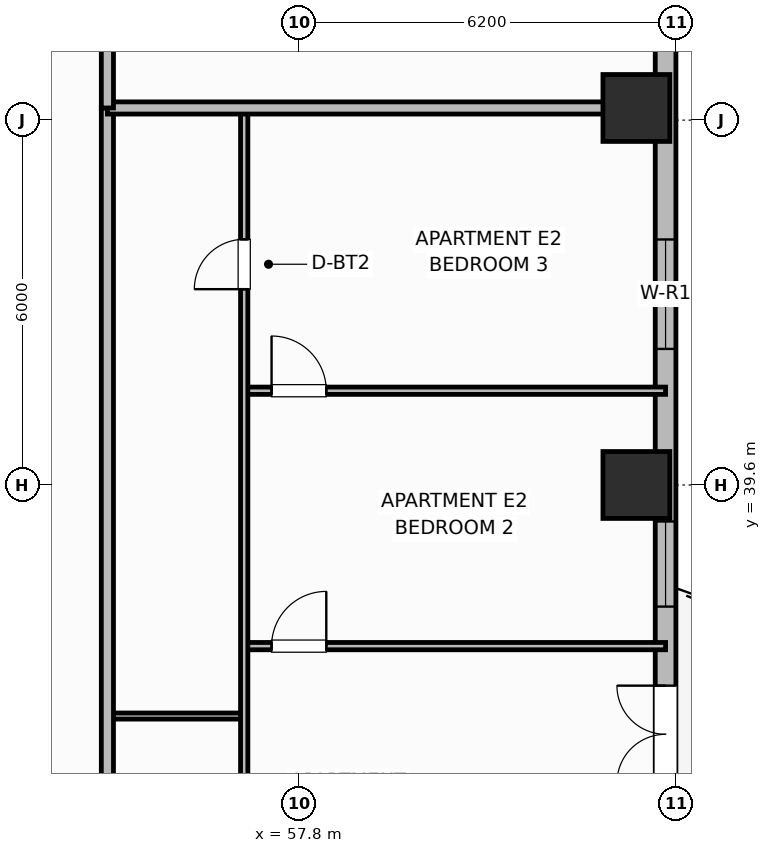
"""IFC4 building model, lengths in metres.
Left out: names, types, materials, properties, quantities, classifications, styles, units other than length and angle.
Written with IfcOpenShell. Run it as: python <this file> out.ifc"""

import sys

from ifc_helpers import new_model, si_unit, direction, frame, frame_2d, origin, origin_2d, place, context, subcontext, project, spatial, rectangle, extrude, element, fill, save


model = new_model("IFC4")
c1 = context("Model", 3, precision=1e-05, world=origin(), true_north=direction((0.0, 1.0)))
c2 = subcontext(c1, "Body", "Model", "MODEL_VIEW")
j1 = project(units=[si_unit("LENGTHUNIT", "METRE"), si_unit("PLANEANGLEUNIT", "RADIAN")], contexts=[c1])
p1 = place(None, origin())
s1 = spatial("IfcSite", under=j1, at=p1, CompositionType="ELEMENT")
p2 = place(p1, origin())
s2 = spatial("IfcBuilding", under=s1, at=p2, CompositionType="ELEMENT")
p3 = place(p2, frame((0.0, 0.0, 95.7)))
s3 = spatial("IfcBuildingStorey", under=s2, at=p3, CompositionType="ELEMENT", Elevation=95.7)
for number, where, z_axis, x_axis in (
    (1, (63.35, 39.6, 0.0), (0.0, 0.0, 1.0), (1.0, 0.0, 0.0)),
    (2, (63.35, 45.8, 0.0), (0.0, 0.0, 1.0), (1.0, 0.0, 0.0)),
):
    element("IfcColumn", number, at=place(p3, frame(where, z_axis=z_axis, x_axis=x_axis)), inside=s3, PredefinedType="COLUMN", context=c2, shape_type="SweptSolid", body=[
        extrude(rectangle(XDim=1.1, YDim=1.1, at=origin_2d()), origin(), (0.0, 0.0, 1.0), 3.7),
    ])
p4 = place(p3, frame((63.83, 32.6, 0.0), z_axis=(0.0, 0.0, 1.0), x_axis=(0.0, 1.0, 0.0)))
e3 = element("IfcWall", 3, at=p4, inside=s3, PredefinedType="SOLIDWALL", context=c2, shape_type="SweptSolid", body=[
    extrude(rectangle(XDim=14.8, YDim=0.34, at=frame_2d((7.4, 0.0))), origin(), (0.0, 0.0, 1.0), 2.7),
])
p5 = place(p4, frame((2.1, 0.0, 0.0)))
e4 = element("IfcOpeningElement", 4, at=p5, cuts=e3, PredefinedType="OPENING", context=c2, shape_type="SweptSolid", body=[
    extrude(rectangle(XDim=1.6, YDim=2.1, at=frame_2d((0.8, 1.05))), frame((0.0, 0.18, 0.0), z_axis=(0.0, -1.0, 0.0), x_axis=(1.0, 0.0, 0.0)), (0.0, 0.0, 1.0), 0.36),
])
p6 = place(p4, frame((5.0, 0.0, 0.69)))
e5 = element("IfcOpeningElement", 5, at=p6, cuts=e3, PredefinedType="OPENING", context=c2, shape_type="SweptSolid", body=[
    extrude(rectangle(XDim=1.4, YDim=1.85, at=frame_2d((0.7, 0.925))), frame((0.0, 0.18, 0.0), z_axis=(0.0, -1.0, 0.0), x_axis=(1.0, 0.0, 0.0)), (0.0, 0.0, 1.0), 0.36),
])
p7 = place(p4, frame((9.238, 0.0, 0.73)))
e6 = element("IfcOpeningElement", 6, at=p7, cuts=e3, PredefinedType="OPENING", context=c2, shape_type="SweptSolid", body=[
    extrude(rectangle(XDim=1.8, YDim=1.85, at=frame_2d((0.9, 0.925))), frame((0.0, 0.18, 0.0), z_axis=(0.0, -1.0, 0.0), x_axis=(1.0, 0.0, 0.0)), (0.0, 0.0, 1.0), 0.36),
])
p8 = place(p3, frame((54.65, 35.8, 0.0), z_axis=(0.0, 0.0, 1.0), x_axis=(1.0, 0.0, 0.0)))
e7 = element("IfcWall", 7, at=p8, inside=s3, PredefinedType="PARTITIONING", context=c2, shape_type="SweptSolid", body=[
    extrude(rectangle(XDim=2.25, YDim=0.1, at=frame_2d((1.125, 0.0))), origin(), (0.0, 0.0, 1.0), 2.53),
])
p9 = place(p3, frame((56.9, 36.95, 0.0), z_axis=(0.0, 0.0, 1.0), x_axis=(1.0, 0.0, 0.0)))
e8 = element("IfcWall", 8, at=p9, inside=s3, PredefinedType="PARTITIONING", context=c2, shape_type="SweptSolid", body=[
    extrude(rectangle(XDim=6.93, YDim=0.12, at=frame_2d((3.465, 0.0))), origin(), (0.0, 0.0, 1.0), 2.53),
])
p10 = place(p9, frame((0.45, 0.0, 0.0)))
e9 = element("IfcOpeningElement", 9, at=p10, cuts=e8, PredefinedType="OPENING", context=c2, shape_type="SweptSolid", body=[
    extrude(rectangle(XDim=0.9, YDim=2.1, at=frame_2d((0.45, 1.05))), frame((0.0, 0.07, 0.0), z_axis=(0.0, -1.0, 0.0), x_axis=(1.0, 0.0, 0.0)), (0.0, 0.0, 1.0), 0.14),
])
p11 = place(p3, frame((56.9, 41.15, 0.0), z_axis=(0.0, 0.0, 1.0), x_axis=(1.0, 0.0, 0.0)))
e10 = element("IfcWall", 10, at=p11, inside=s3, PredefinedType="PARTITIONING", context=c2, shape_type="SweptSolid", body=[
    extrude(rectangle(XDim=6.93, YDim=0.12, at=frame_2d((3.465, 0.0))), origin(), (0.0, 0.0, 1.0), 2.53),
])
p12 = place(p11, frame((0.45, 0.0, 0.0)))
e11 = element("IfcOpeningElement", 11, at=p12, cuts=e10, PredefinedType="OPENING", context=c2, shape_type="SweptSolid", body=[
    extrude(rectangle(XDim=0.9, YDim=2.1, at=frame_2d((0.45, 1.05))), frame((0.0, 0.07, 0.0), z_axis=(0.0, -1.0, 0.0), x_axis=(1.0, 0.0, 0.0)), (0.0, 0.0, 1.0), 0.14),
])
p13 = place(p3, frame((56.9, 26.64, 0.0), z_axis=(0.0, 0.0, 1.0), x_axis=(0.0, 1.0, 0.0)))
e12 = element("IfcWall", 12, at=p13, inside=s3, PredefinedType="PARTITIONING", context=c2, shape_type="SweptSolid", body=[
    extrude(rectangle(XDim=19.12, YDim=0.12, at=frame_2d((9.56, 0.0))), origin(), (0.0, 0.0, 1.0), 2.53),
])
p14 = place(p13, frame((2.81, 0.0, 0.0)))
e13 = element("IfcOpeningElement", 13, at=p14, cuts=e12, PredefinedType="OPENING", context=c2, shape_type="SweptSolid", body=[
    extrude(rectangle(XDim=0.9, YDim=2.1, at=frame_2d((0.45, 1.05))), frame((0.0, 0.07, 0.0), z_axis=(0.0, -1.0, 0.0), x_axis=(1.0, 0.0, 0.0)), (0.0, 0.0, 1.0), 0.14),
])
p15 = place(p13, frame((16.18, 0.0, 0.0)))
e14 = element("IfcOpeningElement", 14, at=p15, cuts=e12, PredefinedType="OPENING", context=c2, shape_type="SweptSolid", body=[
    extrude(rectangle(XDim=0.82, YDim=2.08, at=frame_2d((0.41, 1.04))), frame((0.0, 0.07, 0.0), z_axis=(0.0, -1.0, 0.0), x_axis=(1.0, 0.0, 0.0)), (0.0, 0.0, 1.0), 0.14),
])
p16 = place(p3, frame((54.65, 10.6, 0.0), z_axis=(0.0, 0.0, 1.0), x_axis=(0.0, 1.0, 0.0)))
e15 = element("IfcWall", 15, at=p16, inside=s3, PredefinedType="PARTITIONING", context=c2, shape_type="SweptSolid", body=[
    extrude(rectangle(XDim=35.2, YDim=0.2, at=frame_2d((17.6, 0.0))), origin(), (0.0, 0.0, 1.0), 2.53),
])
p17 = place(p16, frame((2.65, 0.0, 0.0)))
e16 = element("IfcOpeningElement", 16, at=p17, cuts=e15, PredefinedType="OPENING", context=c2, shape_type="SweptSolid", body=[
    extrude(rectangle(XDim=1.0, YDim=2.15, at=frame_2d((0.5, 1.075))), frame((0.0, 0.11, 0.0), z_axis=(0.0, -1.0, 0.0), x_axis=(1.0, 0.0, 0.0)), (0.0, 0.0, 1.0), 0.22),
])
p18 = place(p16, frame((19.95, 0.0, 0.0)))
e17 = element("IfcOpeningElement", 17, at=p18, cuts=e15, PredefinedType="OPENING", context=c2, shape_type="SweptSolid", body=[
    extrude(rectangle(XDim=1.0, YDim=2.15, at=frame_2d((0.5, 1.075))), frame((0.0, 0.11, 0.0), z_axis=(0.0, -1.0, 0.0), x_axis=(1.0, 0.0, 0.0)), (0.0, 0.0, 1.0), 0.22),
])
p19 = place(p3, frame((54.65, 45.8, 0.0), z_axis=(0.0, 0.0, 1.0), x_axis=(1.0, 0.0, 0.0)))
e18 = element("IfcWall", 18, at=p19, inside=s3, PredefinedType="PARTITIONING", context=c2, shape_type="SweptSolid", body=[
    extrude(rectangle(XDim=8.76, YDim=0.2, at=frame_2d((4.38, 0.0))), origin(), (0.0, 0.0, 1.0), 2.53),
])
p20 = place(p3, frame((54.65, 45.8, 0.0), z_axis=(0.0, 0.0, 1.0), x_axis=(0.0, 1.0, 0.0)))
e19 = element("IfcWall", 19, at=p20, inside=s3, PredefinedType="PARTITIONING", context=c2, shape_type="SweptSolid", body=[
    extrude(rectangle(XDim=5.63, YDim=0.2, at=frame_2d((2.815, 0.0))), origin(), (0.0, 0.0, 1.0), 2.53),
])
p21 = place(p5, origin())
e20 = element("IfcDoor", 20, at=p21, inside=s3, OperationType="DOUBLE_DOOR_SINGLE_SWING", PredefinedType="DOOR", context=c2, shape_type="SweptSolid", body=[
    extrude(rectangle(XDim=1.6, YDim=2.1, at=frame_2d((0.8, 1.05))), frame((0.0, 0.025, 0.0), z_axis=(0.0, -1.0, 0.0), x_axis=(1.0, 0.0, 0.0)), (0.0, 0.0, 1.0), 0.05),
])
fill(e4, e20)
p22 = place(p6, origin())
e21 = element("IfcWindow", 21, at=p22, inside=s3, PartitioningType="SINGLE_PANEL", PredefinedType="WINDOW", context=c2, shape_type="SweptSolid", body=[
    extrude(rectangle(XDim=1.4, YDim=1.85, at=frame_2d((0.7, 0.925))), frame((0.0, 0.03, 0.0), z_axis=(0.0, -1.0, 0.0), x_axis=(1.0, 0.0, 0.0)), (0.0, 0.0, 1.0), 0.06),
])
fill(e5, e21)
p23 = place(p7, origin())
e22 = element("IfcWindow", 22, at=p23, inside=s3, PartitioningType="SINGLE_PANEL", PredefinedType="WINDOW", context=c2, shape_type="SweptSolid", body=[
    extrude(rectangle(XDim=1.8, YDim=1.85, at=frame_2d((0.9, 0.925))), frame((0.0, 0.03, 0.0), z_axis=(0.0, -1.0, 0.0), x_axis=(1.0, 0.0, 0.0)), (0.0, 0.0, 1.0), 0.06),
])
fill(e6, e22)
p24 = place(p10, origin())
e23 = element("IfcDoor", 23, at=p24, inside=s3, OperationType="SINGLE_SWING_RIGHT", PredefinedType="DOOR", context=c2, shape_type="SweptSolid", body=[
    extrude(rectangle(XDim=0.9, YDim=2.1, at=frame_2d((0.45, 1.05))), frame((0.0, 0.025, 0.0), z_axis=(0.0, -1.0, 0.0), x_axis=(1.0, 0.0, 0.0)), (0.0, 0.0, 1.0), 0.05),
])
fill(e9, e23)
p25 = place(p12, origin())
e24 = element("IfcDoor", 24, at=p25, inside=s3, OperationType="SINGLE_SWING_LEFT", PredefinedType="DOOR", context=c2, shape_type="SweptSolid", body=[
    extrude(rectangle(XDim=0.9, YDim=2.1, at=frame_2d((0.45, 1.05))), frame((0.0, 0.025, 0.0), z_axis=(0.0, -1.0, 0.0), x_axis=(1.0, 0.0, 0.0)), (0.0, 0.0, 1.0), 0.05),
])
fill(e11, e24)
p26 = place(p15, origin())
e25 = element("IfcDoor", 25, at=p26, inside=s3, OperationType="SINGLE_SWING_LEFT", PredefinedType="DOOR", context=c2, shape_type="SweptSolid", body=[
    extrude(rectangle(XDim=0.82, YDim=2.08, at=frame_2d((0.41, 1.04))), frame((0.0, 0.025, 0.0), z_axis=(0.0, -1.0, 0.0), x_axis=(1.0, 0.0, 0.0)), (0.0, 0.0, 1.0), 0.05),
])
fill(e14, e25)
save(model, sys.argv[1])
